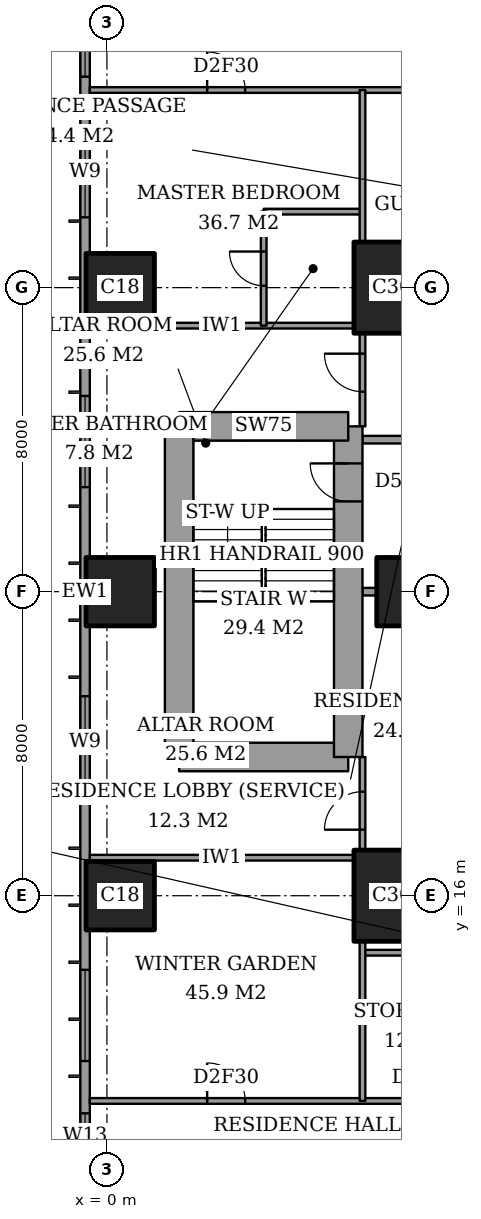
"""IFC4 building model, lengths in metres.
Left out: names, types, materials, properties, quantities, classifications, styles, units other than length and angle.
Written with IfcOpenShell. Run it as: python <this file> out.ifc"""

import sys

from ifc_helpers import new_model, si_unit, direction, frame, frame_2d, origin, origin_2d, place, context, subcontext, project, spatial, rectangle, extrude, element, fill, save


model = new_model("IFC4")
c1 = context("Model", 3, precision=1e-05, world=origin(), true_north=direction((0.0, 1.0)))
c2 = subcontext(c1, "Body", "Model", "MODEL_VIEW")
j1 = project(units=[si_unit("LENGTHUNIT", "METRE"), si_unit("PLANEANGLEUNIT", "RADIAN")], contexts=[c1])
p1 = place(None, origin())
s1 = spatial("IfcSite", under=j1, at=p1, CompositionType="ELEMENT")
p2 = place(p1, origin())
s2 = spatial("IfcBuilding", under=s1, at=p2, CompositionType="ELEMENT")
p3 = place(p2, frame((0.0, 0.0, 207.4)))
s3 = spatial("IfcBuildingStorey", under=s2, at=p3, CompositionType="ELEMENT", Elevation=207.4)
for number, where, z_axis, x_axis in (
    (1, (0.35, 16.0, 0.0), (0.0, 0.0, 1.0), (1.0, 0.0, 0.0)),
    (2, (0.35, 24.0, 0.0), (0.0, 0.0, 1.0), (1.0, 0.0, 0.0)),
    (3, (0.35, 32.0, 0.0), (0.0, 0.0, 1.0), (1.0, 0.0, 0.0)),
):
    element("IfcColumn", number, at=place(p3, frame(where, z_axis=z_axis, x_axis=x_axis)), inside=s3, PredefinedType="COLUMN", context=c2, shape_type="SweptSolid", body=[
        extrude(rectangle(XDim=1.8, YDim=1.8, at=origin_2d()), origin(), (0.0, 0.0, 1.0), 3.6),
    ])
p4 = place(p3, frame((8.0, 16.0, 0.0), z_axis=(0.0, 0.0, 1.0), x_axis=(1.0, 0.0, 0.0)))
e4 = element("IfcColumn", 4, at=p4, inside=s3, PredefinedType="COLUMN", context=c2, shape_type="SweptSolid", body=[
    extrude(rectangle(XDim=3.0, YDim=2.4, at=origin_2d()), origin(), (0.0, 0.0, 1.0), 3.6),
])
p5 = place(p3, frame((8.0, 24.0, 0.0), z_axis=(0.0, 0.0, 1.0), x_axis=(1.0, 0.0, 0.0)))
e5 = element("IfcColumn", 5, at=p5, inside=s3, PredefinedType="COLUMN", context=c2, shape_type="SweptSolid", body=[
    extrude(rectangle(XDim=1.8, YDim=1.8, at=origin_2d()), origin(), (0.0, 0.0, 1.0), 3.6),
])
p6 = place(p3, frame((8.0, 32.0, 0.0), z_axis=(0.0, 0.0, 1.0), x_axis=(1.0, 0.0, 0.0)))
e6 = element("IfcColumn", 6, at=p6, inside=s3, PredefinedType="COLUMN", context=c2, shape_type="SweptSolid", body=[
    extrude(rectangle(XDim=3.0, YDim=2.4, at=origin_2d()), origin(), (0.0, 0.0, 1.0), 3.6),
])
p7 = place(p3, frame((1.9, 19.65, 0.0), z_axis=(0.0, 0.0, 1.0), x_axis=(1.0, 0.0, 0.0)))
e7 = element("IfcWall", 7, at=p7, inside=s3, PredefinedType="SHEAR", context=c2, shape_type="SweptSolid", body=[
    extrude(rectangle(XDim=4.45, YDim=0.75, at=frame_2d((2.225, 0.0))), origin(), (0.0, 0.0, 1.0), 3.6),
])
p8 = place(p3, frame((6.35, 19.65, 0.0), z_axis=(0.0, 0.0, 1.0), x_axis=(0.0, 1.0, 0.0)))
e8 = element("IfcWall", 8, at=p8, inside=s3, PredefinedType="SHEAR", context=c2, shape_type="SweptSolid", body=[
    extrude(rectangle(XDim=8.7, YDim=0.75, at=frame_2d((4.35, 0.0))), origin(), (0.0, 0.0, 1.0), 3.6),
])
p9 = place(p8, frame((6.725, 0.0, 0.0)))
e9 = element("IfcOpeningElement", 9, at=p9, cuts=e8, PredefinedType="OPENING", context=c2, shape_type="SweptSolid", body=[
    extrude(rectangle(XDim=1.0, YDim=2.1, at=frame_2d((0.5, 1.05))), frame((0.0, 0.385, 0.0), z_axis=(0.0, -1.0, 0.0), x_axis=(1.0, 0.0, 0.0)), (0.0, 0.0, 1.0), 0.77),
])
p10 = place(p3, frame((6.35, 28.35, 0.0), z_axis=(0.0, 0.0, 1.0), x_axis=(-1.0, 0.0, 0.0)))
e10 = element("IfcWall", 10, at=p10, inside=s3, PredefinedType="SHEAR", context=c2, shape_type="SweptSolid", body=[
    extrude(rectangle(XDim=4.45, YDim=0.75, at=frame_2d((2.225, 0.0))), origin(), (0.0, 0.0, 1.0), 3.6),
])
p11 = place(p3, frame((1.9, 28.35, 0.0), z_axis=(0.0, 0.0, 1.0), x_axis=(0.0, -1.0, 0.0)))
e11 = element("IfcWall", 11, at=p11, inside=s3, PredefinedType="SHEAR", context=c2, shape_type="SweptSolid", body=[
    extrude(rectangle(XDim=8.7, YDim=0.75, at=frame_2d((4.35, 0.0))), origin(), (0.0, 0.0, 1.0), 3.6),
])
p12 = place(p3, frame((-0.575, 44.825, 0.0), z_axis=(0.0, 0.0, 1.0), x_axis=(0.0, -1.0, 0.0)))
e12 = element("IfcWall", 12, at=p12, inside=s3, PredefinedType="SOLIDWALL", context=c2, shape_type="SweptSolid", body=[
    extrude(rectangle(XDim=41.65, YDim=0.25, at=frame_2d((20.825, 0.0))), origin(), (0.0, 0.0, 1.0), 3.6),
])
p13 = place(p12, frame((0.825, 0.0, 0.2)))
e13 = element("IfcOpeningElement", 13, at=p13, cuts=e12, PredefinedType="OPENING", context=c2, shape_type="SweptSolid", body=[
    extrude(rectangle(XDim=2.4, YDim=2.4, at=frame_2d((1.2, 1.2))), frame((0.0, 0.135, 0.0), z_axis=(0.0, -1.0, 0.0), x_axis=(1.0, 0.0, 0.0)), (0.0, 0.0, 1.0), 0.27),
])
p14 = place(p12, frame((6.075, 0.0, 0.2)))
e14 = element("IfcOpeningElement", 14, at=p14, cuts=e12, PredefinedType="OPENING", context=c2, shape_type="SweptSolid", body=[
    extrude(rectangle(XDim=1.2, YDim=2.4, at=frame_2d((0.6, 1.2))), frame((0.0, 0.135, 0.0), z_axis=(0.0, -1.0, 0.0), x_axis=(1.0, 0.0, 0.0)), (0.0, 0.0, 1.0), 0.27),
])
p15 = place(p12, frame((8.575, 0.0, 0.2)))
e15 = element("IfcOpeningElement", 15, at=p15, cuts=e12, PredefinedType="OPENING", context=c2, shape_type="SweptSolid", body=[
    extrude(rectangle(XDim=2.4, YDim=2.4, at=frame_2d((1.2, 1.2))), frame((0.0, 0.135, 0.0), z_axis=(0.0, -1.0, 0.0), x_axis=(1.0, 0.0, 0.0)), (0.0, 0.0, 1.0), 0.27),
])
p16 = place(p12, frame((15.675, 0.0, 0.2)))
e16 = element("IfcOpeningElement", 16, at=p16, cuts=e12, PredefinedType="OPENING", context=c2, shape_type="SweptSolid", body=[
    extrude(rectangle(XDim=2.4, YDim=2.4, at=frame_2d((1.2, 1.2))), frame((0.0, 0.135, 0.0), z_axis=(0.0, -1.0, 0.0), x_axis=(1.0, 0.0, 0.0)), (0.0, 0.0, 1.0), 0.27),
])
p17 = place(p12, frame((23.575, 0.0, 0.2)))
e17 = element("IfcOpeningElement", 17, at=p17, cuts=e12, PredefinedType="OPENING", context=c2, shape_type="SweptSolid", body=[
    extrude(rectangle(XDim=2.4, YDim=2.4, at=frame_2d((1.2, 1.2))), frame((0.0, 0.135, 0.0), z_axis=(0.0, -1.0, 0.0), x_axis=(1.0, 0.0, 0.0)), (0.0, 0.0, 1.0), 0.27),
])
p18 = place(p12, frame((30.775, 0.0, 0.2)))
e18 = element("IfcOpeningElement", 18, at=p18, cuts=e12, PredefinedType="OPENING", context=c2, shape_type="SweptSolid", body=[
    extrude(rectangle(XDim=2.4, YDim=2.4, at=frame_2d((1.2, 1.2))), frame((0.0, 0.135, 0.0), z_axis=(0.0, -1.0, 0.0), x_axis=(1.0, 0.0, 0.0)), (0.0, 0.0, 1.0), 0.27),
])
p19 = place(p12, frame((34.55, 0.0, 0.2)))
e19 = element("IfcOpeningElement", 19, at=p19, cuts=e12, PredefinedType="OPENING", context=c2, shape_type="SweptSolid", body=[
    extrude(rectangle(XDim=1.2, YDim=2.4, at=frame_2d((0.6, 1.2))), frame((0.0, 0.135, 0.0), z_axis=(0.0, -1.0, 0.0), x_axis=(1.0, 0.0, 0.0)), (0.0, 0.0, 1.0), 0.27),
])
p20 = place(p12, frame((38.425, 0.0, 0.2)))
e20 = element("IfcOpeningElement", 20, at=p20, cuts=e12, PredefinedType="OPENING", context=c2, shape_type="SweptSolid", body=[
    extrude(rectangle(XDim=2.4, YDim=2.4, at=frame_2d((1.2, 1.2))), frame((0.0, 0.135, 0.0), z_axis=(0.0, -1.0, 0.0), x_axis=(1.0, 0.0, 0.0)), (0.0, 0.0, 1.0), 0.27),
])
p21 = place(p3, frame((-0.45, 10.6, 0.0), z_axis=(0.0, 0.0, 1.0), x_axis=(1.0, 0.0, 0.0)))
e21 = element("IfcWall", 21, at=p21, inside=s3, PredefinedType="PARTITIONING", context=c2, shape_type="SweptSolid", body=[
    extrude(rectangle(XDim=25.011, YDim=0.15, at=frame_2d((12.505, 0.0))), origin(), (0.0, 0.0, 1.0), 3.35),
])
p22 = place(p21, frame((13.25, 0.0, 0.0)))
e22 = element("IfcOpeningElement", 22, at=p22, cuts=e21, PredefinedType="OPENING", context=c2, shape_type="SweptSolid", body=[
    extrude(rectangle(XDim=1.0, YDim=2.1, at=frame_2d((0.5, 1.05))), frame((0.0, 0.085, 0.0), z_axis=(0.0, -1.0, 0.0), x_axis=(1.0, 0.0, 0.0)), (0.0, 0.0, 1.0), 0.17),
])
p23 = place(p21, frame((3.087, 0.0, 0.0)))
e23 = element("IfcOpeningElement", 23, at=p23, cuts=e21, PredefinedType="OPENING", context=c2, shape_type="SweptSolid", body=[
    extrude(rectangle(XDim=1.0, YDim=2.1, at=frame_2d((0.5, 1.05))), frame((0.0, 0.085, 0.0), z_axis=(0.0, -1.0, 0.0), x_axis=(1.0, 0.0, 0.0)), (0.0, 0.0, 1.0), 0.17),
])
p24 = place(p21, frame((8.363, 0.0, 0.0)))
e24 = element("IfcOpeningElement", 24, at=p24, cuts=e21, PredefinedType="OPENING", context=c2, shape_type="SweptSolid", body=[
    extrude(rectangle(XDim=0.9, YDim=2.1, at=frame_2d((0.45, 1.05))), frame((0.0, 0.085, 0.0), z_axis=(0.0, -1.0, 0.0), x_axis=(1.0, 0.0, 0.0)), (0.0, 0.0, 1.0), 0.17),
])
p25 = place(p21, frame((11.05, 0.0, 0.0)))
e25 = element("IfcOpeningElement", 25, at=p25, cuts=e21, PredefinedType="OPENING", context=c2, shape_type="SweptSolid", body=[
    extrude(rectangle(XDim=1.0, YDim=2.1, at=frame_2d((0.5, 1.05))), frame((0.0, 0.085, 0.0), z_axis=(0.0, -1.0, 0.0), x_axis=(1.0, 0.0, 0.0)), (0.0, 0.0, 1.0), 0.17),
])
p26 = place(p21, frame((16.15, 0.0, 0.0)))
e26 = element("IfcOpeningElement", 26, at=p26, cuts=e21, PredefinedType="OPENING", context=c2, shape_type="SweptSolid", body=[
    extrude(rectangle(XDim=1.0, YDim=2.1, at=frame_2d((0.5, 1.05))), frame((0.0, 0.085, 0.0), z_axis=(0.0, -1.0, 0.0), x_axis=(1.0, 0.0, 0.0)), (0.0, 0.0, 1.0), 0.17),
])
p27 = place(p21, frame((21.175, 0.0, 0.0)))
e27 = element("IfcOpeningElement", 27, at=p27, cuts=e21, PredefinedType="OPENING", context=c2, shape_type="SweptSolid", body=[
    extrude(rectangle(XDim=1.0, YDim=2.1, at=frame_2d((0.5, 1.05))), frame((0.0, 0.085, 0.0), z_axis=(0.0, -1.0, 0.0), x_axis=(1.0, 0.0, 0.0)), (0.0, 0.0, 1.0), 0.17),
])
p28 = place(p3, frame((6.725, 14.5, 0.0), z_axis=(0.0, 0.0, 1.0), x_axis=(1.0, 0.0, 0.0)))
e28 = element("IfcWall", 28, at=p28, inside=s3, PredefinedType="PARTITIONING", context=c2, shape_type="SweptSolid", body=[
    extrude(rectangle(XDim=3.275, YDim=0.15, at=frame_2d((1.637, 0.0))), origin(), (0.0, 0.0, 1.0), 3.35),
])
p29 = place(p3, frame((-0.45, 17.0, 0.0), z_axis=(0.0, 0.0, 1.0), x_axis=(1.0, 0.0, 0.0)))
e29 = element("IfcWall", 29, at=p29, inside=s3, PredefinedType="PARTITIONING", context=c2, shape_type="SweptSolid", body=[
    extrude(rectangle(XDim=6.95, YDim=0.15, at=frame_2d((3.475, 0.0))), origin(), (0.0, 0.0, 1.0), 3.35),
])
p30 = place(p3, frame((6.725, 24.0, 0.0), z_axis=(0.0, 0.0, 1.0), x_axis=(1.0, 0.0, 0.0)))
e30 = element("IfcWall", 30, at=p30, inside=s3, PredefinedType="PARTITIONING", context=c2, shape_type="SweptSolid", body=[
    extrude(rectangle(XDim=0.375, YDim=0.2, at=frame_2d((0.188, 0.0))), origin(), (0.0, 0.0, 1.0), 3.35),
])
p31 = place(p3, frame((6.725, 28.0, 0.0), z_axis=(0.0, 0.0, 1.0), x_axis=(1.0, 0.0, 0.0)))
e31 = element("IfcWall", 31, at=p31, inside=s3, PredefinedType="PARTITIONING", context=c2, shape_type="SweptSolid", body=[
    extrude(rectangle(XDim=17.275, YDim=0.2, at=frame_2d((8.637, 0.0))), origin(), (0.0, 0.0, 1.0), 3.35),
])
p32 = place(p31, frame((7.175, 0.0, 0.0)))
e32 = element("IfcOpeningElement", 32, at=p32, cuts=e31, PredefinedType="OPENING", context=c2, shape_type="SweptSolid", body=[
    extrude(rectangle(XDim=1.2, YDim=2.4, at=frame_2d((0.6, 1.2))), frame((0.0, 0.11, 0.0), z_axis=(0.0, -1.0, 0.0), x_axis=(1.0, 0.0, 0.0)), (0.0, 0.0, 1.0), 0.22),
])
p33 = place(p3, frame((-0.45, 31.0, 0.0), z_axis=(0.0, 0.0, 1.0), x_axis=(1.0, 0.0, 0.0)))
e33 = element("IfcWall", 33, at=p33, inside=s3, PredefinedType="PARTITIONING", context=c2, shape_type="SweptSolid", body=[
    extrude(rectangle(XDim=6.95, YDim=0.15, at=frame_2d((3.475, 0.0))), origin(), (0.0, 0.0, 1.0), 3.35),
])
p34 = place(p3, frame((4.125, 34.0, 0.0), z_axis=(0.0, 0.0, 1.0), x_axis=(1.0, 0.0, 0.0)))
e34 = element("IfcWall", 34, at=p34, inside=s3, PredefinedType="PARTITIONING", context=c2, shape_type="SweptSolid", body=[
    extrude(rectangle(XDim=2.6, YDim=0.15, at=frame_2d((1.3, 0.0))), origin(), (0.0, 0.0, 1.0), 3.35),
])
p35 = place(p3, frame((-0.45, 37.2, 0.0), z_axis=(0.0, 0.0, 1.0), x_axis=(1.0, 0.0, 0.0)))
e35 = element("IfcWall", 35, at=p35, inside=s3, PredefinedType="PARTITIONING", context=c2, shape_type="SweptSolid", body=[
    extrude(rectangle(XDim=25.011, YDim=0.15, at=frame_2d((12.505, 0.0))), origin(), (0.0, 0.0, 1.0), 3.35),
])
p36 = place(p35, frame((12.05, 0.0, 0.0)))
e36 = element("IfcOpeningElement", 36, at=p36, cuts=e35, PredefinedType="OPENING", context=c2, shape_type="SweptSolid", body=[
    extrude(rectangle(XDim=1.0, YDim=2.1, at=frame_2d((0.5, 1.05))), frame((0.0, 0.085, 0.0), z_axis=(0.0, -1.0, 0.0), x_axis=(1.0, 0.0, 0.0)), (0.0, 0.0, 1.0), 0.17),
])
p37 = place(p35, frame((3.087, 0.0, 0.0)))
e37 = element("IfcOpeningElement", 37, at=p37, cuts=e35, PredefinedType="OPENING", context=c2, shape_type="SweptSolid", body=[
    extrude(rectangle(XDim=1.0, YDim=2.1, at=frame_2d((0.5, 1.05))), frame((0.0, 0.085, 0.0), z_axis=(0.0, -1.0, 0.0), x_axis=(1.0, 0.0, 0.0)), (0.0, 0.0, 1.0), 0.17),
])
p38 = place(p35, frame((8.863, 0.0, 0.0)))
e38 = element("IfcOpeningElement", 38, at=p38, cuts=e35, PredefinedType="OPENING", context=c2, shape_type="SweptSolid", body=[
    extrude(rectangle(XDim=0.9, YDim=2.1, at=frame_2d((0.45, 1.05))), frame((0.0, 0.085, 0.0), z_axis=(0.0, -1.0, 0.0), x_axis=(1.0, 0.0, 0.0)), (0.0, 0.0, 1.0), 0.17),
])
p39 = place(p35, frame((15.55, 0.0, 0.0)))
e39 = element("IfcOpeningElement", 39, at=p39, cuts=e35, PredefinedType="OPENING", context=c2, shape_type="SweptSolid", body=[
    extrude(rectangle(XDim=1.0, YDim=2.1, at=frame_2d((0.5, 1.05))), frame((0.0, 0.085, 0.0), z_axis=(0.0, -1.0, 0.0), x_axis=(1.0, 0.0, 0.0)), (0.0, 0.0, 1.0), 0.17),
])
p40 = place(p35, frame((21.175, 0.0, 0.0)))
e40 = element("IfcOpeningElement", 40, at=p40, cuts=e35, PredefinedType="OPENING", context=c2, shape_type="SweptSolid", body=[
    extrude(rectangle(XDim=1.0, YDim=2.1, at=frame_2d((0.5, 1.05))), frame((0.0, 0.085, 0.0), z_axis=(0.0, -1.0, 0.0), x_axis=(1.0, 0.0, 0.0)), (0.0, 0.0, 1.0), 0.17),
])
p41 = place(p3, frame((4.125, 31.0, 0.0), z_axis=(0.0, 0.0, 1.0), x_axis=(0.0, 1.0, 0.0)))
e41 = element("IfcWall", 41, at=p41, inside=s3, PredefinedType="PARTITIONING", context=c2, shape_type="SweptSolid", body=[
    extrude(rectangle(XDim=3.0, YDim=0.15, at=frame_2d((1.5, 0.0))), origin(), (0.0, 0.0, 1.0), 3.35),
])
p42 = place(p41, frame((1.05, 0.0, 0.0)))
e42 = element("IfcOpeningElement", 42, at=p42, cuts=e41, PredefinedType="OPENING", context=c2, shape_type="SweptSolid", body=[
    extrude(rectangle(XDim=0.9, YDim=2.1, at=frame_2d((0.45, 1.05))), frame((0.0, 0.085, 0.0), z_axis=(0.0, -1.0, 0.0), x_axis=(1.0, 0.0, 0.0)), (0.0, 0.0, 1.0), 0.17),
])
p43 = place(p3, frame((6.725, 10.6, 0.0), z_axis=(0.0, 0.0, 1.0), x_axis=(0.0, 1.0, 0.0)))
e43 = element("IfcWall", 43, at=p43, inside=s3, PredefinedType="PARTITIONING", context=c2, shape_type="SweptSolid", body=[
    extrude(rectangle(XDim=4.2, YDim=0.15, at=frame_2d((2.1, 0.0))), origin(), (0.0, 0.0, 1.0), 3.35),
])
p44 = place(p3, frame((6.725, 17.2, 0.0), z_axis=(0.0, 0.0, 1.0), x_axis=(0.0, 1.0, 0.0)))
e44 = element("IfcWall", 44, at=p44, inside=s3, PredefinedType="PARTITIONING", context=c2, shape_type="SweptSolid", body=[
    extrude(rectangle(XDim=2.45, YDim=0.15, at=frame_2d((1.225, 0.0))), origin(), (0.0, 0.0, 1.0), 3.35),
])
p45 = place(p44, frame((0.538, 0.0, 0.0)))
e45 = element("IfcOpeningElement", 45, at=p45, cuts=e44, PredefinedType="OPENING", context=c2, shape_type="SweptSolid", body=[
    extrude(rectangle(XDim=1.0, YDim=2.1, at=frame_2d((0.5, 1.05))), frame((0.0, 0.085, 0.0), z_axis=(0.0, -1.0, 0.0), x_axis=(1.0, 0.0, 0.0)), (0.0, 0.0, 1.0), 0.17),
])
p46 = place(p3, frame((6.725, 28.35, 0.0), z_axis=(0.0, 0.0, 1.0), x_axis=(0.0, 1.0, 0.0)))
e46 = element("IfcWall", 46, at=p46, inside=s3, PredefinedType="PARTITIONING", context=c2, shape_type="SweptSolid", body=[
    extrude(rectangle(XDim=2.45, YDim=0.15, at=frame_2d((1.225, 0.0))), origin(), (0.0, 0.0, 1.0), 3.35),
])
p47 = place(p46, frame((0.913, 0.0, 0.0)))
e47 = element("IfcOpeningElement", 47, at=p47, cuts=e46, PredefinedType="OPENING", context=c2, shape_type="SweptSolid", body=[
    extrude(rectangle(XDim=1.0, YDim=2.1, at=frame_2d((0.5, 1.05))), frame((0.0, 0.085, 0.0), z_axis=(0.0, -1.0, 0.0), x_axis=(1.0, 0.0, 0.0)), (0.0, 0.0, 1.0), 0.17),
])
p48 = place(p3, frame((6.725, 33.2, 0.0), z_axis=(0.0, 0.0, 1.0), x_axis=(0.0, 1.0, 0.0)))
e48 = element("IfcWall", 48, at=p48, inside=s3, PredefinedType="PARTITIONING", context=c2, shape_type="SweptSolid", body=[
    extrude(rectangle(XDim=4.0, YDim=0.15, at=frame_2d((2.0, 0.0))), origin(), (0.0, 0.0, 1.0), 3.35),
])
p49 = place(p14, origin())
e49 = element("IfcWindow", 49, at=p49, inside=s3, PartitioningType="SINGLE_PANEL", PredefinedType="WINDOW", context=c2, shape_type="SweptSolid", body=[
    extrude(rectangle(XDim=1.2, YDim=2.4, at=frame_2d((0.6, 1.2))), frame((0.0, 0.03, 0.0), z_axis=(0.0, -1.0, 0.0), x_axis=(1.0, 0.0, 0.0)), (0.0, 0.0, 1.0), 0.06),
])
fill(e14, e49)
p50 = place(p15, origin())
e50 = element("IfcWindow", 50, at=p50, inside=s3, PartitioningType="SINGLE_PANEL", PredefinedType="WINDOW", context=c2, shape_type="SweptSolid", body=[
    extrude(rectangle(XDim=2.4, YDim=2.4, at=frame_2d((1.2, 1.2))), frame((0.0, 0.03, 0.0), z_axis=(0.0, -1.0, 0.0), x_axis=(1.0, 0.0, 0.0)), (0.0, 0.0, 1.0), 0.06),
])
fill(e15, e50)
p51 = place(p16, origin())
e51 = element("IfcWindow", 51, at=p51, inside=s3, PartitioningType="SINGLE_PANEL", PredefinedType="WINDOW", context=c2, shape_type="SweptSolid", body=[
    extrude(rectangle(XDim=2.4, YDim=2.4, at=frame_2d((1.2, 1.2))), frame((0.0, 0.03, 0.0), z_axis=(0.0, -1.0, 0.0), x_axis=(1.0, 0.0, 0.0)), (0.0, 0.0, 1.0), 0.06),
])
fill(e16, e51)
p52 = place(p17, origin())
e52 = element("IfcWindow", 52, at=p52, inside=s3, PartitioningType="SINGLE_PANEL", PredefinedType="WINDOW", context=c2, shape_type="SweptSolid", body=[
    extrude(rectangle(XDim=2.4, YDim=2.4, at=frame_2d((1.2, 1.2))), frame((0.0, 0.03, 0.0), z_axis=(0.0, -1.0, 0.0), x_axis=(1.0, 0.0, 0.0)), (0.0, 0.0, 1.0), 0.06),
])
fill(e17, e52)
p53 = place(p18, origin())
e53 = element("IfcWindow", 53, at=p53, inside=s3, PartitioningType="SINGLE_PANEL", PredefinedType="WINDOW", context=c2, shape_type="SweptSolid", body=[
    extrude(rectangle(XDim=2.4, YDim=2.4, at=frame_2d((1.2, 1.2))), frame((0.0, 0.03, 0.0), z_axis=(0.0, -1.0, 0.0), x_axis=(1.0, 0.0, 0.0)), (0.0, 0.0, 1.0), 0.06),
])
fill(e18, e53)
p54 = place(p19, origin())
e54 = element("IfcWindow", 54, at=p54, inside=s3, PartitioningType="SINGLE_PANEL", PredefinedType="WINDOW", context=c2, shape_type="SweptSolid", body=[
    extrude(rectangle(XDim=1.2, YDim=2.4, at=frame_2d((0.6, 1.2))), frame((0.0, 0.03, 0.0), z_axis=(0.0, -1.0, 0.0), x_axis=(1.0, 0.0, 0.0)), (0.0, 0.0, 1.0), 0.06),
])
fill(e19, e54)
p55 = place(p23, origin())
e55 = element("IfcDoor", 55, at=p55, inside=s3, OperationType="SINGLE_SWING_RIGHT", PredefinedType="DOOR", context=c2, shape_type="SweptSolid", body=[
    extrude(rectangle(XDim=1.0, YDim=2.1, at=frame_2d((0.5, 1.05))), frame((0.0, 0.025, 0.0), z_axis=(0.0, -1.0, 0.0), x_axis=(1.0, 0.0, 0.0)), (0.0, 0.0, 1.0), 0.05),
])
fill(e23, e55)
p56 = place(p45, origin())
e56 = element("IfcDoor", 56, at=p56, inside=s3, OperationType="SINGLE_SWING_RIGHT", PredefinedType="DOOR", context=c2, shape_type="SweptSolid", body=[
    extrude(rectangle(XDim=1.0, YDim=2.1, at=frame_2d((0.5, 1.05))), frame((0.0, 0.025, 0.0), z_axis=(0.0, -1.0, 0.0), x_axis=(1.0, 0.0, 0.0)), (0.0, 0.0, 1.0), 0.05),
])
fill(e45, e56)
p57 = place(p42, origin())
e57 = element("IfcDoor", 57, at=p57, inside=s3, OperationType="SINGLE_SWING_LEFT", PredefinedType="DOOR", context=c2, shape_type="SweptSolid", body=[
    extrude(rectangle(XDim=0.9, YDim=2.1, at=frame_2d((0.45, 1.05))), frame((0.0, 0.025, 0.0), z_axis=(0.0, -1.0, 0.0), x_axis=(1.0, 0.0, 0.0)), (0.0, 0.0, 1.0), 0.05),
])
fill(e42, e57)
p58 = place(p37, origin())
e58 = element("IfcDoor", 58, at=p58, inside=s3, OperationType="SINGLE_SWING_RIGHT", PredefinedType="DOOR", context=c2, shape_type="SweptSolid", body=[
    extrude(rectangle(XDim=1.0, YDim=2.1, at=frame_2d((0.5, 1.05))), frame((0.0, 0.025, 0.0), z_axis=(0.0, -1.0, 0.0), x_axis=(1.0, 0.0, 0.0)), (0.0, 0.0, 1.0), 0.05),
])
fill(e37, e58)
p59 = place(p47, origin())
e59 = element("IfcDoor", 59, at=p59, inside=s3, OperationType="SINGLE_SWING_LEFT", PredefinedType="DOOR", context=c2, shape_type="SweptSolid", body=[
    extrude(rectangle(XDim=1.0, YDim=2.1, at=frame_2d((0.5, 1.05))), frame((0.0, 0.025, 0.0), z_axis=(0.0, -1.0, 0.0), x_axis=(1.0, 0.0, 0.0)), (0.0, 0.0, 1.0), 0.05),
])
fill(e47, e59)
p60 = place(p9, origin())
e60 = element("IfcDoor", 60, at=p60, inside=s3, OperationType="SINGLE_SWING_LEFT", PredefinedType="DOOR", context=c2, shape_type="SweptSolid", body=[
    extrude(rectangle(XDim=1.0, YDim=2.1, at=frame_2d((0.5, 1.05))), frame((0.0, 0.025, 0.0), z_axis=(0.0, -1.0, 0.0), x_axis=(1.0, 0.0, 0.0)), (0.0, 0.0, 1.0), 0.05),
])
fill(e9, e60)
save(model, sys.argv[1])
